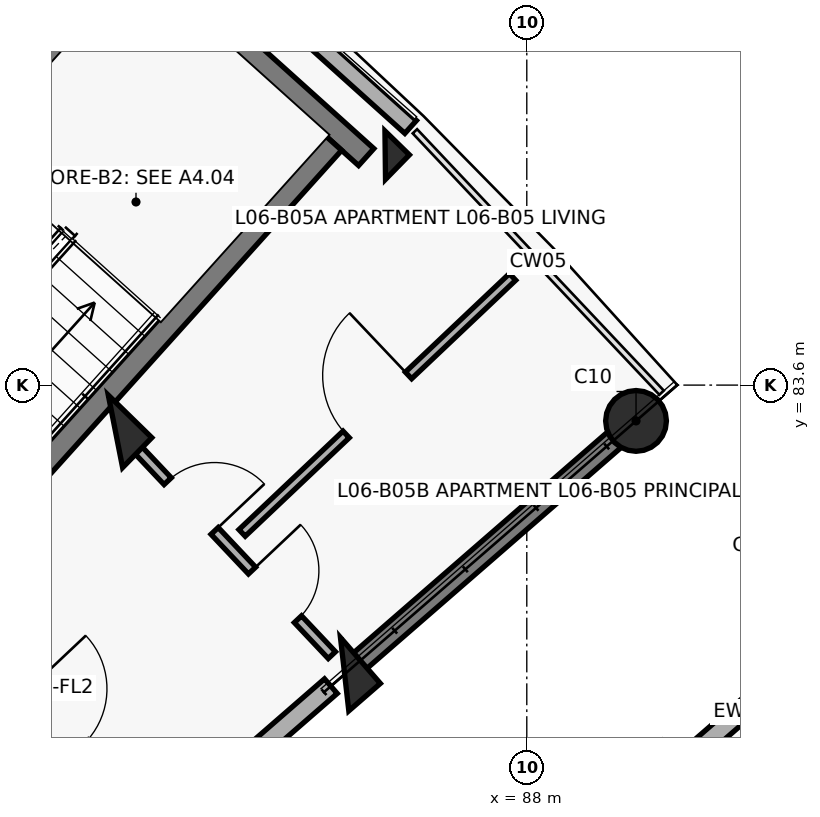
"""IFC4 building model, lengths in metres.
Left out: names, types, materials, properties, quantities, classifications, styles, units other than length and angle.
Written with IfcOpenShell. Run it as: python <this file> out.ifc"""

import sys

from ifc_helpers import new_model, si_unit, direction, frame, frame_2d, origin, origin_2d, place, context, subcontext, project, spatial, rectangle, circle, extrude, element, fill, save


model = new_model("IFC4")
c1 = context("Model", 3, precision=1e-05, world=origin(), true_north=direction((0.0, 1.0)))
c2 = subcontext(c1, "Body", "Model", "MODEL_VIEW")
j1 = project(units=[si_unit("LENGTHUNIT", "METRE"), si_unit("PLANEANGLEUNIT", "RADIAN")], contexts=[c1])
p1 = place(None, origin())
s1 = spatial("IfcSite", under=j1, at=p1, CompositionType="ELEMENT")
p2 = place(p1, origin())
s2 = spatial("IfcBuilding", under=s1, at=p2, CompositionType="ELEMENT")
p3 = place(p2, frame((0.0, 0.0, 20.5)))
s3 = spatial("IfcBuildingStorey", under=s2, at=p3, CompositionType="ELEMENT", Elevation=20.5)
p4 = place(p3, frame((82.588, 82.991, 0.0), z_axis=(0.0, 0.0, 1.0), x_axis=(0.698665066769, 0.715448897181, 0.0)))
e1 = element("IfcColumn", 1, at=p4, inside=s3, PredefinedType="COLUMN", context=c2, shape_type="SweptSolid", body=[
    extrude(rectangle(XDim=0.55, YDim=0.8, at=origin_2d()), origin(), (0.0, 0.0, 1.0), 3.1),
])
p5 = place(p3, frame((86.137, 86.626, 0.0), z_axis=(0.0, 0.0, 1.0), x_axis=(0.698665066769, 0.715448897181, 0.0)))
e2 = element("IfcColumn", 2, at=p5, inside=s3, PredefinedType="COLUMN", context=c2, shape_type="SweptSolid", body=[
    extrude(rectangle(XDim=0.45, YDim=0.45, at=origin_2d()), origin(), (0.0, 0.0, 1.0), 3.1),
])
p6 = place(p3, frame((85.603, 79.796, 0.0), z_axis=(0.0, 0.0, 1.0), x_axis=(0.754709580223, 0.656059028991, 0.0)))
e3 = element("IfcColumn", 3, at=p6, inside=s3, PredefinedType="COLUMN", context=c2, shape_type="SweptSolid", body=[
    extrude(rectangle(XDim=0.55, YDim=0.8, at=origin_2d()), origin(), (0.0, 0.0, 1.0), 3.1),
])
p7 = place(p3, frame((89.437, 83.129, 0.0), z_axis=(0.0, 0.0, 1.0), x_axis=(0.754709580223, 0.656059028991, 0.0)))
e4 = element("IfcColumn", 4, at=p7, inside=s3, PredefinedType="COLUMN", context=c2, shape_type="SweptSolid", body=[
    extrude(circle(Radius=0.4, at=origin_2d()), origin(), (0.0, 0.0, 1.0), 3.1),
])
p8 = place(p3, frame((85.739, 79.914, 0.0), z_axis=(0.0, 0.0, 1.0), x_axis=(0.754703505217, 0.65606601742, 0.0)))
e5 = element("IfcWall", 5, at=p8, inside=s3, PredefinedType="SHEAR", context=c2, shape_type="SweptSolid", body=[
    extrude(rectangle(XDim=4.72, YDim=0.27, at=frame_2d((2.36, 0.0))), origin(), (0.0, 0.0, 1.0), 2.86),
])
p9 = place(p3, frame((82.897, 90.213, 0.0), z_axis=(0.0, 0.0, 1.0), x_axis=(0.743387539862, -0.668860946369, 0.0)))
e6 = element("IfcWall", 6, at=p9, inside=s3, PredefinedType="SOLIDWALL", context=c2, shape_type="SweptSolid", body=[
    extrude(rectangle(XDim=4.809, YDim=0.228, at=frame_2d((2.405, 0.0))), origin(), (0.0, 0.0, 1.0), 2.25),
])
p10 = place(p3, frame((79.234, 74.259, 0.0), z_axis=(0.0, 0.0, 1.0), x_axis=(0.754717680958, 0.656049710044, 0.0)))
e7 = element("IfcWall", 7, at=p10, inside=s3, PredefinedType="SOLIDWALL", context=c2, shape_type="SweptSolid", body=[
    extrude(rectangle(XDim=8.2, YDim=0.255, at=frame_2d((4.1, 0.0))), origin(), (0.0, 0.0, 1.0), 2.18),
])
p11 = place(p10, frame((3.59, 0.0, 0.75)))
e8 = element("IfcOpeningElement", 8, at=p11, cuts=e7, PredefinedType="OPENING", context=c2, shape_type="SweptSolid", body=[
    extrude(rectangle(XDim=1.35, YDim=1.35, at=frame_2d((0.675, 0.675))), frame((0.0, 0.137, 0.0), z_axis=(0.0, -1.0, 0.0), x_axis=(1.0, 0.0, 0.0)), (0.0, 0.0, 1.0), 0.275),
])
p12 = place(p3, frame((91.746, 80.101, 0.0), z_axis=(0.0, 0.0, 1.0), x_axis=(-0.754704866158, -0.656064451862, 0.0)))
e9 = element("IfcWall", 9, at=p12, inside=s3, PredefinedType="SOLIDWALL", context=c2, shape_type="SweptSolid", body=[
    extrude(rectangle(XDim=8.2, YDim=0.255, at=frame_2d((4.1, 0.0))), origin(), (0.0, 0.0, 1.0), 2.18),
])
p13 = place(p12, frame((3.59, 0.0, 0.75)))
e10 = element("IfcOpeningElement", 10, at=p13, cuts=e9, PredefinedType="OPENING", context=c2, shape_type="SweptSolid", body=[
    extrude(rectangle(XDim=1.35, YDim=1.35, at=frame_2d((0.675, 0.675))), frame((0.0, 0.137, 0.0), z_axis=(0.0, -1.0, 0.0), x_axis=(1.0, 0.0, 0.0)), (0.0, 0.0, 1.0), 0.275),
])
p14 = place(p3, frame((85.887, 86.601, 0.0), z_axis=(0.0, 0.0, 1.0), x_axis=(-0.743400052815, 0.668847038922, 0.0)))
e11 = element("IfcWall", 11, at=p14, inside=s3, PredefinedType="SHEAR", context=c2, shape_type="SweptSolid", body=[
    extrude(rectangle(XDim=4.47, YDim=0.3, at=frame_2d((2.235, 0.0))), origin(), (0.0, 0.0, 1.0), 3.1),
])
p15 = place(p3, frame((80.309, 81.073, 0.0), z_axis=(0.0, 0.0, 1.0), x_axis=(0.668885797871, 0.743365179038, 0.0)))
e12 = element("IfcWall", 12, at=p15, inside=s3, PredefinedType="SHEAR", context=c2, shape_type="SweptSolid", body=[
    extrude(rectangle(XDim=7.69, YDim=0.3, at=frame_2d((3.845, 0.0))), origin(), (0.0, 0.0, 1.0), 3.1),
])
p16 = place(p3, frame((77.655, 83.461, 0.0), z_axis=(0.0, 0.0, 1.0), x_axis=(0.668868253964, 0.743380964808, 0.0)))
e13 = element("IfcWall", 13, at=p16, inside=s3, PredefinedType="SHEAR", context=c2, shape_type="SweptSolid", body=[
    extrude(rectangle(XDim=7.69, YDim=0.3, at=frame_2d((3.845, 0.0))), origin(), (0.0, 0.0, 1.0), 3.1),
])
p17 = place(p3, frame((80.628, 80.483, 0.0), z_axis=(0.0, 0.0, 1.0), x_axis=(0.686310507227, -0.727308660522, 0.0)))
e14 = element("IfcWall", 14, at=p17, inside=s3, PredefinedType="SOLIDWALL", context=c2, shape_type="SweptSolid", body=[
    extrude(rectangle(XDim=3.436, YDim=0.2, at=frame_2d((1.718, 0.0))), origin(), (0.0, 0.0, 1.0), 2.08),
])
p18 = place(p17, frame((1.208, 0.0, 0.0)))
e15 = element("IfcOpeningElement", 15, at=p18, cuts=e14, PredefinedType="OPENING", context=c2, shape_type="SweptSolid", body=[
    extrude(rectangle(XDim=1.02, YDim=2.15, at=frame_2d((0.51, 1.075))), frame((0.0, 0.11, 0.0), z_axis=(0.0, -1.0, 0.0), x_axis=(1.0, 0.0, 0.0)), (0.0, 0.0, 1.0), 0.22),
])
p19 = place(p3, frame((82.829, 82.809, 0.0), z_axis=(0.0, 0.0, 1.0), x_axis=(0.686300649561, -0.727317962388, 0.0)))
e16 = element("IfcWall", 16, at=p19, inside=s3, PredefinedType="PARTITIONING", context=c2, shape_type="SweptSolid", body=[
    extrude(rectangle(XDim=3.797, YDim=0.13, at=frame_2d((1.899, 0.0))), origin(), (0.0, 0.0, 1.0), 2.08),
])
p20 = place(p19, frame((0.65, 0.0, 0.0)))
e17 = element("IfcOpeningElement", 17, at=p20, cuts=e16, PredefinedType="OPENING", context=c2, shape_type="SweptSolid", body=[
    extrude(rectangle(XDim=0.9, YDim=2.1, at=frame_2d((0.45, 1.05))), frame((0.0, 0.075, 0.0), z_axis=(0.0, -1.0, 0.0), x_axis=(1.0, 0.0, 0.0)), (0.0, 0.0, 1.0), 0.15),
])
p21 = place(p19, frame((2.267, 0.0, 0.0)))
e18 = element("IfcOpeningElement", 18, at=p21, cuts=e16, PredefinedType="OPENING", context=c2, shape_type="SweptSolid", body=[
    extrude(rectangle(XDim=0.88, YDim=2.1, at=frame_2d((0.44, 1.05))), frame((0.0, 0.075, 0.0), z_axis=(0.0, -1.0, 0.0), x_axis=(1.0, 0.0, 0.0)), (0.0, 0.0, 1.0), 0.15),
])
p22 = place(p3, frame((84.254, 81.655, 0.0), z_axis=(0.0, 0.0, 1.0), x_axis=(0.726295620759, 0.687382478149, 0.0)))
e19 = element("IfcWall", 19, at=p22, inside=s3, PredefinedType="PARTITIONING", context=c2, shape_type="SweptSolid", body=[
    extrude(rectangle(XDim=4.9, YDim=0.12, at=frame_2d((2.45, 0.0))), origin(), (0.0, 0.0, 1.0), 2.08),
])
p23 = place(p22, frame((1.885, 0.0, 0.0)))
e20 = element("IfcOpeningElement", 20, at=p23, cuts=e19, PredefinedType="OPENING", context=c2, shape_type="SweptSolid", body=[
    extrude(rectangle(XDim=1.13, YDim=2.1, at=frame_2d((0.565, 1.05))), frame((0.0, 0.07, 0.0), z_axis=(0.0, -1.0, 0.0), x_axis=(1.0, 0.0, 0.0)), (0.0, 0.0, 1.0), 0.14),
])
p24 = place(p18, origin())
e21 = element("IfcDoor", 21, at=p24, inside=s3, OperationType="SINGLE_SWING_LEFT", PredefinedType="DOOR", context=c2, shape_type="SweptSolid", body=[
    extrude(rectangle(XDim=1.02, YDim=2.15, at=frame_2d((0.51, 1.075))), frame((0.0, 0.025, 0.0), z_axis=(0.0, -1.0, 0.0), x_axis=(1.0, 0.0, 0.0)), (0.0, 0.0, 1.0), 0.05),
])
fill(e15, e21)
p25 = place(p20, origin())
e22 = element("IfcDoor", 22, at=p25, inside=s3, OperationType="SINGLE_SWING_RIGHT", PredefinedType="DOOR", context=c2, shape_type="SweptSolid", body=[
    extrude(rectangle(XDim=0.9, YDim=2.1, at=frame_2d((0.45, 1.05))), frame((0.0, 0.025, 0.0), z_axis=(0.0, -1.0, 0.0), x_axis=(1.0, 0.0, 0.0)), (0.0, 0.0, 1.0), 0.05),
])
fill(e17, e22)
p26 = place(p21, origin())
e23 = element("IfcDoor", 23, at=p26, inside=s3, OperationType="SINGLE_SWING_LEFT", PredefinedType="DOOR", context=c2, shape_type="SweptSolid", body=[
    extrude(rectangle(XDim=0.88, YDim=2.1, at=frame_2d((0.44, 1.05))), frame((0.0, 0.025, 0.0), z_axis=(0.0, -1.0, 0.0), x_axis=(1.0, 0.0, 0.0)), (0.0, 0.0, 1.0), 0.05),
])
fill(e18, e23)
p27 = place(p23, origin())
e24 = element("IfcDoor", 24, at=p27, inside=s3, OperationType="SINGLE_SWING_RIGHT", PredefinedType="DOOR", context=c2, shape_type="SweptSolid", body=[
    extrude(rectangle(XDim=1.13, YDim=2.1, at=frame_2d((0.565, 1.05))), frame((0.0, 0.025, 0.0), z_axis=(0.0, -1.0, 0.0), x_axis=(1.0, 0.0, 0.0)), (0.0, 0.0, 1.0), 0.05),
])
fill(e20, e24)
save(model, sys.argv[1])
